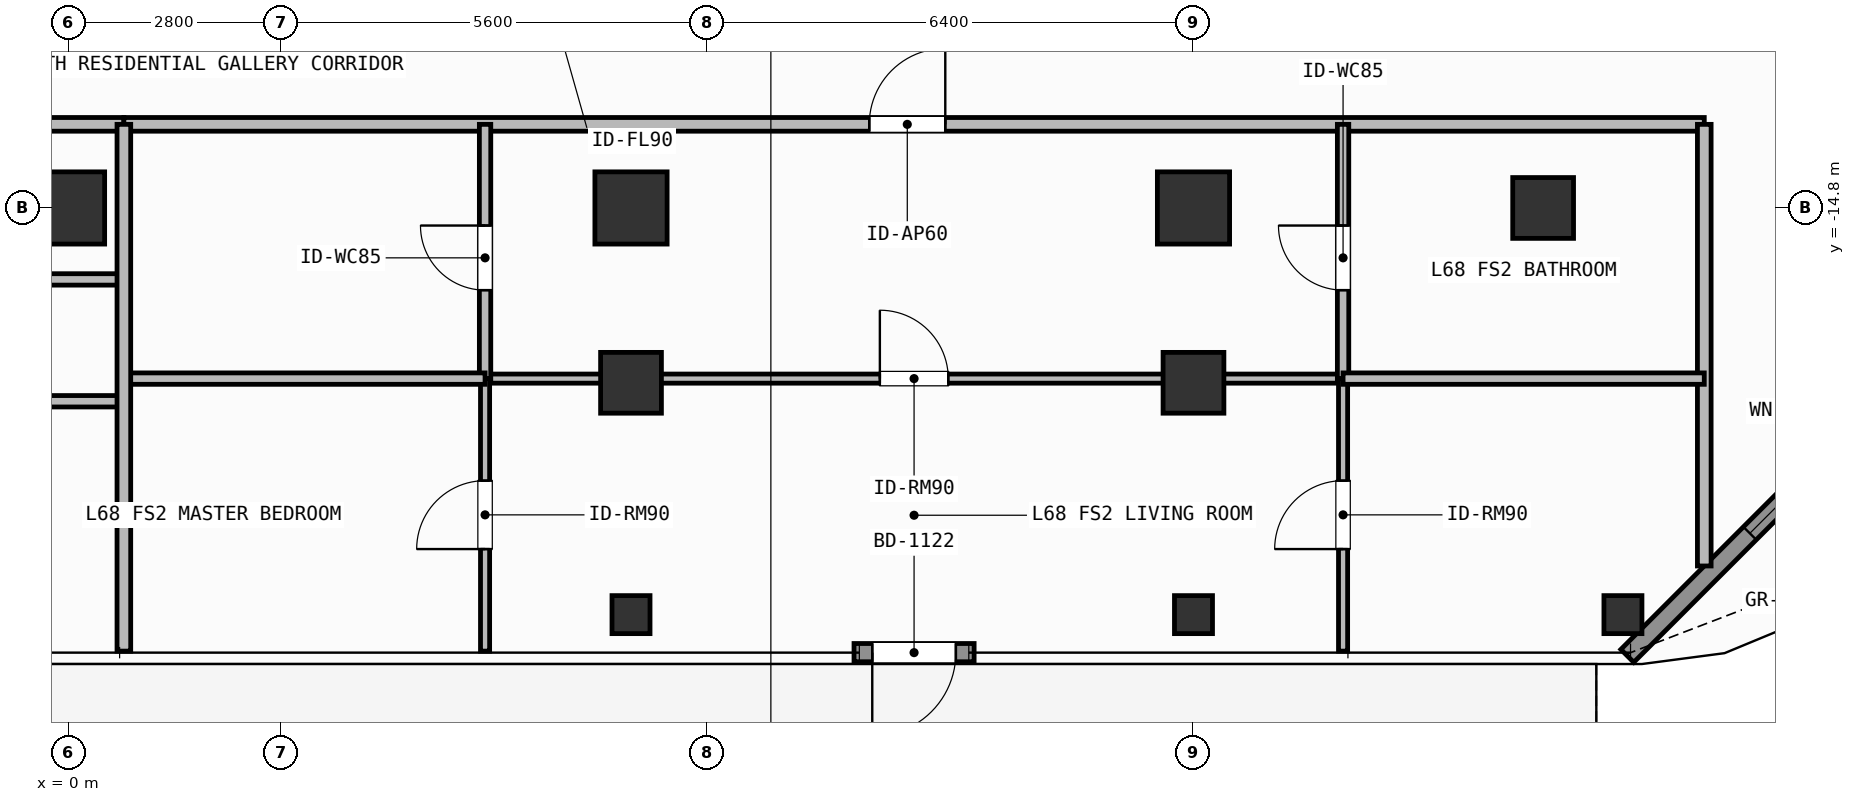
"""IFC4 building model, lengths in metres.
Left out: names, types, materials, properties, quantities, classifications, styles, units other than length and angle.
Written with IfcOpenShell. Run it as: python <this file> out.ifc"""

import sys

from ifc_helpers import new_model, si_unit, direction, frame, frame_2d, origin, origin_2d, place, context, subcontext, project, spatial, rectangle, hollow_rectangle, extrude, element, fill, save


model = new_model("IFC4")
c1 = context("Model", 3, precision=1e-05, world=origin(), true_north=direction((0.0, 1.0)))
c2 = subcontext(c1, "Body", "Model", "MODEL_VIEW")
j1 = project(units=[si_unit("LENGTHUNIT", "METRE"), si_unit("PLANEANGLEUNIT", "RADIAN")], contexts=[c1])
p1 = place(None, origin())
s1 = spatial("IfcSite", under=j1, at=p1, CompositionType="ELEMENT")
p2 = place(p1, origin())
s2 = spatial("IfcBuilding", under=s1, at=p2, CompositionType="ELEMENT")
p3 = place(p2, frame((0.0, 0.0, 278.1)))
s3 = spatial("IfcBuildingStorey", under=s2, at=p3, CompositionType="ELEMENT", Elevation=278.1)
for number, where, z_axis, x_axis in (
    (1, (0.0, -14.8, 0.0), (0.0, 0.0, 1.0), (1.0, 0.0, 0.0)),
    (2, (7.4, -14.8, 0.0), (0.0, 0.0, 1.0), (1.0, 0.0, 0.0)),
    (3, (14.8, -14.8, 0.0), (0.0, 0.0, 1.0), (1.0, 0.0, 0.0)),
):
    element("IfcColumn", number, at=place(p3, frame(where, z_axis=z_axis, x_axis=x_axis)), inside=s3, PredefinedType="COLUMN", context=c2, shape_type="SweptSolid", body=[
        extrude(rectangle(XDim=0.95, YDim=0.95, at=origin_2d()), origin(), (0.0, 0.0, 1.0), 3.9),
    ])
for number, where, z_axis, x_axis in (
    (4, (19.4, -14.8, 0.0), (0.0, 0.0, 1.0), (1.0, 0.0, 0.0)),
    (5, (7.4, -17.1, 0.0), (0.0, 0.0, 1.0), (1.0, 0.0, 0.0)),
    (6, (14.8, -17.1, 0.0), (0.0, 0.0, 1.0), (1.0, 0.0, 0.0)),
):
    element("IfcColumn", number, at=place(p3, frame(where, z_axis=z_axis, x_axis=x_axis)), inside=s3, PredefinedType="COLUMN", context=c2, shape_type="SweptSolid", body=[
        extrude(hollow_rectangle(XDim=0.8, YDim=0.8, WallThickness=0.036, at=origin_2d()), origin(), (0.0, 0.0, 1.0), 3.9),
    ])
for number, where, z_axis, x_axis in (
    (7, (20.45, -20.15, 0.0), (0.0, 0.0, 1.0), (1.0, 0.0, 0.0)),
    (8, (7.4, -20.15, 0.0), (0.0, 0.0, 1.0), (1.0, 0.0, 0.0)),
    (9, (14.8, -20.15, 0.0), (0.0, 0.0, 1.0), (1.0, 0.0, 0.0)),
):
    element("IfcColumn", number, at=place(p3, frame(where, z_axis=z_axis, x_axis=x_axis)), inside=s3, PredefinedType="COLUMN", context=c2, shape_type="SweptSolid", body=[
        extrude(hollow_rectangle(XDim=0.5, YDim=0.5, WallThickness=0.025, at=origin_2d()), origin(), (0.0, 0.0, 1.0), 3.9),
    ])
p4 = place(p3, frame((11.914, -20.65, 0.0), z_axis=(0.0, 0.0, 1.0), x_axis=(-1.0, 0.0, 0.0)))
e10 = element("IfcWall", 10, at=p4, inside=s3, PredefinedType="SOLIDWALL", context=c2, shape_type="SweptSolid", body=[
    extrude(rectangle(XDim=1.58, YDim=0.24, at=frame_2d((0.79, 0.0))), origin(), (0.0, 0.0, 1.0), 3.68),
])
p5 = place(p4, frame((0.24, 0.0, 0.0)))
e11 = element("IfcOpeningElement", 11, at=p5, cuts=e10, PredefinedType="OPENING", context=c2, shape_type="SweptSolid", body=[
    extrude(rectangle(XDim=1.1, YDim=2.2, at=frame_2d((0.55, 1.1))), frame((0.0, 0.13, 0.0), z_axis=(0.0, -1.0, 0.0), x_axis=(1.0, 0.0, 0.0)), (0.0, 0.0, 1.0), 0.26),
])
p6 = place(p3, frame((24.792, -16.408, 0.0), z_axis=(0.0, 0.0, 1.0), x_axis=(-0.707126925818, -0.707086635981, 0.0)))
e12 = element("IfcWall", 12, at=p6, inside=s3, PredefinedType="SOLIDWALL", context=c2, shape_type="SweptSolid", body=[
    extrude(rectangle(XDim=6.06, YDim=0.24, at=frame_2d((3.03, 0.0))), origin(), (0.0, 0.0, 1.0), 3.68),
])
p7 = place(p6, frame((2.28, 0.0, 0.8)))
e13 = element("IfcOpeningElement", 13, at=p7, cuts=e12, PredefinedType="OPENING", context=c2, shape_type="SweptSolid", body=[
    extrude(rectangle(XDim=1.5, YDim=1.85, at=frame_2d((0.75, 0.925))), frame((0.0, 0.13, 0.0), z_axis=(0.0, -1.0, 0.0), x_axis=(1.0, 0.0, 0.0)), (0.0, 0.0, 1.0), 0.26),
])
p8 = place(p3, frame((-13.72, -13.7, 0.0), z_axis=(0.0, 0.0, 1.0), x_axis=(1.0, 0.0, 0.0)))
e14 = element("IfcWall", 14, at=p8, inside=s3, PredefinedType="PARTITIONING", context=c2, shape_type="SweptSolid", body=[
    extrude(rectangle(XDim=14.448, YDim=0.18, at=frame_2d((7.224, 0.0))), origin(), (0.0, 0.0, 1.0), 3.68),
])
p9 = place(p8, frame((6.994, 0.0, 0.0)))
e15 = element("IfcOpeningElement", 15, at=p9, cuts=e14, PredefinedType="OPENING", context=c2, shape_type="SweptSolid", body=[
    extrude(rectangle(XDim=1.0, YDim=2.2, at=frame_2d((0.5, 1.1))), frame((0.0, 0.1, 0.0), z_axis=(0.0, -1.0, 0.0), x_axis=(1.0, 0.0, 0.0)), (0.0, 0.0, 1.0), 0.2),
])
p10 = place(p3, frame((0.728, -13.7, 0.0), z_axis=(0.0, 0.0, 1.0), x_axis=(1.0, 0.0, 0.0)))
e16 = element("IfcWall", 16, at=p10, inside=s3, PredefinedType="PARTITIONING", context=c2, shape_type="SweptSolid", body=[
    extrude(rectangle(XDim=20.792, YDim=0.18, at=frame_2d((10.396, 0.0))), origin(), (0.0, 0.0, 1.0), 3.68),
])
p11 = place(p10, frame((9.807, 0.0, 0.0)))
e17 = element("IfcOpeningElement", 17, at=p11, cuts=e16, PredefinedType="OPENING", context=c2, shape_type="SweptSolid", body=[
    extrude(rectangle(XDim=1.0, YDim=2.2, at=frame_2d((0.5, 1.1))), frame((0.0, 0.1, 0.0), z_axis=(0.0, -1.0, 0.0), x_axis=(1.0, 0.0, 0.0)), (0.0, 0.0, 1.0), 0.2),
])
p12 = place(p3, frame((5.48, -17.045, 0.0), z_axis=(0.0, 0.0, 1.0), x_axis=(1.0, 0.0, 0.0)))
e18 = element("IfcWall", 18, at=p12, inside=s3, PredefinedType="PARTITIONING", context=c2, shape_type="SweptSolid", body=[
    extrude(rectangle(XDim=11.288, YDim=0.12, at=frame_2d((5.644, 0.0))), origin(), (0.0, 0.0, 1.0), 3.182),
])
p13 = place(p12, frame((5.194, 0.0, 0.0)))
e19 = element("IfcOpeningElement", 19, at=p13, cuts=e18, PredefinedType="OPENING", context=c2, shape_type="SweptSolid", body=[
    extrude(rectangle(XDim=0.9, YDim=2.1, at=frame_2d((0.45, 1.05))), frame((0.0, 0.07, 0.0), z_axis=(0.0, -1.0, 0.0), x_axis=(1.0, 0.0, 0.0)), (0.0, 0.0, 1.0), 0.14),
])
p14 = place(p3, frame((5.48, -17.045, 0.0), z_axis=(0.0, 0.0, 1.0), x_axis=(0.0, 1.0, 0.0)))
e20 = element("IfcWall", 20, at=p14, inside=s3, PredefinedType="PARTITIONING", context=c2, shape_type="SweptSolid", body=[
    extrude(rectangle(XDim=3.345, YDim=0.15, at=frame_2d((1.672, 0.0))), origin(), (0.0, 0.0, 1.0), 3.68),
])
p15 = place(p14, frame((1.164, 0.0, 0.0)))
e21 = element("IfcOpeningElement", 21, at=p15, cuts=e20, PredefinedType="OPENING", context=c2, shape_type="SweptSolid", body=[
    extrude(rectangle(XDim=0.85, YDim=2.1, at=frame_2d((0.425, 1.05))), frame((0.0, 0.085, 0.0), z_axis=(0.0, -1.0, 0.0), x_axis=(1.0, 0.0, 0.0)), (0.0, 0.0, 1.0), 0.17),
])
p16 = place(p3, frame((5.48, -20.63, 0.0), z_axis=(0.0, 0.0, 1.0), x_axis=(0.0, 1.0, 0.0)))
e22 = element("IfcWall", 22, at=p16, inside=s3, PredefinedType="PARTITIONING", context=c2, shape_type="SweptSolid", body=[
    extrude(rectangle(XDim=3.585, YDim=0.12, at=frame_2d((1.792, 0.0))), origin(), (0.0, 0.0, 1.0), 3.68),
])
p17 = place(p16, frame((1.343, 0.0, 0.0)))
e23 = element("IfcOpeningElement", 23, at=p17, cuts=e22, PredefinedType="OPENING", context=c2, shape_type="SweptSolid", body=[
    extrude(rectangle(XDim=0.9, YDim=2.1, at=frame_2d((0.45, 1.05))), frame((0.0, 0.07, 0.0), z_axis=(0.0, -1.0, 0.0), x_axis=(1.0, 0.0, 0.0)), (0.0, 0.0, 1.0), 0.14),
])
p18 = place(p3, frame((16.768, -17.045, 0.0), z_axis=(0.0, 0.0, 1.0), x_axis=(0.0, 1.0, 0.0)))
e24 = element("IfcWall", 24, at=p18, inside=s3, PredefinedType="PARTITIONING", context=c2, shape_type="SweptSolid", body=[
    extrude(rectangle(XDim=3.345, YDim=0.15, at=frame_2d((1.672, 0.0))), origin(), (0.0, 0.0, 1.0), 3.68),
])
p19 = place(p18, frame((1.164, 0.0, 0.0)))
e25 = element("IfcOpeningElement", 25, at=p19, cuts=e24, PredefinedType="OPENING", context=c2, shape_type="SweptSolid", body=[
    extrude(rectangle(XDim=0.85, YDim=2.1, at=frame_2d((0.425, 1.05))), frame((0.0, 0.085, 0.0), z_axis=(0.0, -1.0, 0.0), x_axis=(1.0, 0.0, 0.0)), (0.0, 0.0, 1.0), 0.17),
])
p20 = place(p3, frame((16.768, -20.63, 0.0), z_axis=(0.0, 0.0, 1.0), x_axis=(0.0, 1.0, 0.0)))
e26 = element("IfcWall", 26, at=p20, inside=s3, PredefinedType="PARTITIONING", context=c2, shape_type="SweptSolid", body=[
    extrude(rectangle(XDim=3.585, YDim=0.12, at=frame_2d((1.792, 0.0))), origin(), (0.0, 0.0, 1.0), 3.68),
])
p21 = place(p20, frame((1.343, 0.0, 0.0)))
e27 = element("IfcOpeningElement", 27, at=p21, cuts=e26, PredefinedType="OPENING", context=c2, shape_type="SweptSolid", body=[
    extrude(rectangle(XDim=0.9, YDim=2.1, at=frame_2d((0.45, 1.05))), frame((0.0, 0.07, 0.0), z_axis=(0.0, -1.0, 0.0), x_axis=(1.0, 0.0, 0.0)), (0.0, 0.0, 1.0), 0.14),
])
p22 = place(p3, frame((21.52, -19.51, 0.0), z_axis=(0.0, 0.0, 1.0), x_axis=(0.0, 1.0, 0.0)))
e28 = element("IfcWall", 28, at=p22, inside=s3, PredefinedType="PARTITIONING", context=c2, shape_type="SweptSolid", body=[
    extrude(rectangle(XDim=5.81, YDim=0.18, at=frame_2d((2.905, 0.0))), origin(), (0.0, 0.0, 1.0), 3.68),
])
p23 = place(p3, frame((-4.297, -15.74, 0.0), z_axis=(0.0, 0.0, 1.0), x_axis=(1.0, 0.0, 0.0)))
e29 = element("IfcWall", 29, at=p23, inside=s3, PredefinedType="PARTITIONING", context=c2, shape_type="SweptSolid", body=[
    extrude(rectangle(XDim=5.025, YDim=0.15, at=frame_2d((2.513, 0.0))), origin(), (0.0, 0.0, 1.0), 3.68),
])
p24 = place(p3, frame((-4.297, -17.343, 0.0), z_axis=(0.0, 0.0, 1.0), x_axis=(1.0, 0.0, 0.0)))
e30 = element("IfcWall", 30, at=p24, inside=s3, PredefinedType="PARTITIONING", context=c2, shape_type="SweptSolid", body=[
    extrude(rectangle(XDim=5.025, YDim=0.15, at=frame_2d((2.513, 0.0))), origin(), (0.0, 0.0, 1.0), 3.182),
])
p25 = place(p3, frame((0.728, -17.045, 0.0), z_axis=(0.0, 0.0, 1.0), x_axis=(1.0, 0.0, 0.0)))
e31 = element("IfcWall", 31, at=p25, inside=s3, PredefinedType="PARTITIONING", context=c2, shape_type="SweptSolid", body=[
    extrude(rectangle(XDim=4.752, YDim=0.15, at=frame_2d((2.376, 0.0))), origin(), (0.0, 0.0, 1.0), 3.182),
])
p26 = place(p3, frame((16.768, -17.045, 0.0), z_axis=(0.0, 0.0, 1.0), x_axis=(1.0, 0.0, 0.0)))
e32 = element("IfcWall", 32, at=p26, inside=s3, PredefinedType="PARTITIONING", context=c2, shape_type="SweptSolid", body=[
    extrude(rectangle(XDim=4.752, YDim=0.15, at=frame_2d((2.376, 0.0))), origin(), (0.0, 0.0, 1.0), 3.68),
])
p27 = place(p3, frame((0.728, -20.63, 0.0), z_axis=(0.0, 0.0, 1.0), x_axis=(0.0, 1.0, 0.0)))
e33 = element("IfcWall", 33, at=p27, inside=s3, PredefinedType="PARTITIONING", context=c2, shape_type="SweptSolid", body=[
    extrude(rectangle(XDim=6.93, YDim=0.18, at=frame_2d((3.465, 0.0))), origin(), (0.0, 0.0, 1.0), 3.68),
])
p28 = place(p5, origin())
e34 = element("IfcDoor", 34, at=p28, inside=s3, OperationType="SINGLE_SWING_RIGHT", PredefinedType="DOOR", context=c2, shape_type="SweptSolid", body=[
    extrude(rectangle(XDim=1.1, YDim=2.2, at=frame_2d((0.55, 1.1))), frame((0.0, 0.025, 0.0), z_axis=(0.0, -1.0, 0.0), x_axis=(1.0, 0.0, 0.0)), (0.0, 0.0, 1.0), 0.05),
])
fill(e11, e34)
p29 = place(p7, origin())
e35 = element("IfcWindow", 35, at=p29, inside=s3, PartitioningType="SINGLE_PANEL", PredefinedType="WINDOW", context=c2, shape_type="SweptSolid", body=[
    extrude(rectangle(XDim=1.5, YDim=1.85, at=frame_2d((0.75, 0.925))), frame((0.0, 0.03, 0.0), z_axis=(0.0, -1.0, 0.0), x_axis=(1.0, 0.0, 0.0)), (0.0, 0.0, 1.0), 0.06),
])
fill(e13, e35)
p30 = place(p11, origin())
e36 = element("IfcDoor", 36, at=p30, inside=s3, OperationType="SINGLE_SWING_RIGHT", PredefinedType="DOOR", context=c2, shape_type="SweptSolid", body=[
    extrude(rectangle(XDim=1.0, YDim=2.2, at=frame_2d((0.5, 1.1))), frame((0.0, 0.025, 0.0), z_axis=(0.0, -1.0, 0.0), x_axis=(1.0, 0.0, 0.0)), (0.0, 0.0, 1.0), 0.05),
])
fill(e17, e36)
p31 = place(p13, origin())
e37 = element("IfcDoor", 37, at=p31, inside=s3, OperationType="SINGLE_SWING_LEFT", PredefinedType="DOOR", context=c2, shape_type="SweptSolid", body=[
    extrude(rectangle(XDim=0.9, YDim=2.1, at=frame_2d((0.45, 1.05))), frame((0.0, 0.025, 0.0), z_axis=(0.0, -1.0, 0.0), x_axis=(1.0, 0.0, 0.0)), (0.0, 0.0, 1.0), 0.05),
])
fill(e19, e37)
p32 = place(p15, origin())
e38 = element("IfcDoor", 38, at=p32, inside=s3, OperationType="SINGLE_SWING_RIGHT", PredefinedType="DOOR", context=c2, shape_type="SweptSolid", body=[
    extrude(rectangle(XDim=0.85, YDim=2.1, at=frame_2d((0.425, 1.05))), frame((0.0, 0.025, 0.0), z_axis=(0.0, -1.0, 0.0), x_axis=(1.0, 0.0, 0.0)), (0.0, 0.0, 1.0), 0.05),
])
fill(e21, e38)
p33 = place(p17, origin())
e39 = element("IfcDoor", 39, at=p33, inside=s3, OperationType="SINGLE_SWING_LEFT", PredefinedType="DOOR", context=c2, shape_type="SweptSolid", body=[
    extrude(rectangle(XDim=0.9, YDim=2.1, at=frame_2d((0.45, 1.05))), frame((0.0, 0.025, 0.0), z_axis=(0.0, -1.0, 0.0), x_axis=(1.0, 0.0, 0.0)), (0.0, 0.0, 1.0), 0.05),
])
fill(e23, e39)
p34 = place(p19, origin())
e40 = element("IfcDoor", 40, at=p34, inside=s3, OperationType="SINGLE_SWING_RIGHT", PredefinedType="DOOR", context=c2, shape_type="SweptSolid", body=[
    extrude(rectangle(XDim=0.85, YDim=2.1, at=frame_2d((0.425, 1.05))), frame((0.0, 0.025, 0.0), z_axis=(0.0, -1.0, 0.0), x_axis=(1.0, 0.0, 0.0)), (0.0, 0.0, 1.0), 0.05),
])
fill(e25, e40)
p35 = place(p21, origin())
e41 = element("IfcDoor", 41, at=p35, inside=s3, OperationType="SINGLE_SWING_LEFT", PredefinedType="DOOR", context=c2, shape_type="SweptSolid", body=[
    extrude(rectangle(XDim=0.9, YDim=2.1, at=frame_2d((0.45, 1.05))), frame((0.0, 0.025, 0.0), z_axis=(0.0, -1.0, 0.0), x_axis=(1.0, 0.0, 0.0)), (0.0, 0.0, 1.0), 0.05),
])
fill(e27, e41)
save(model, sys.argv[1])
